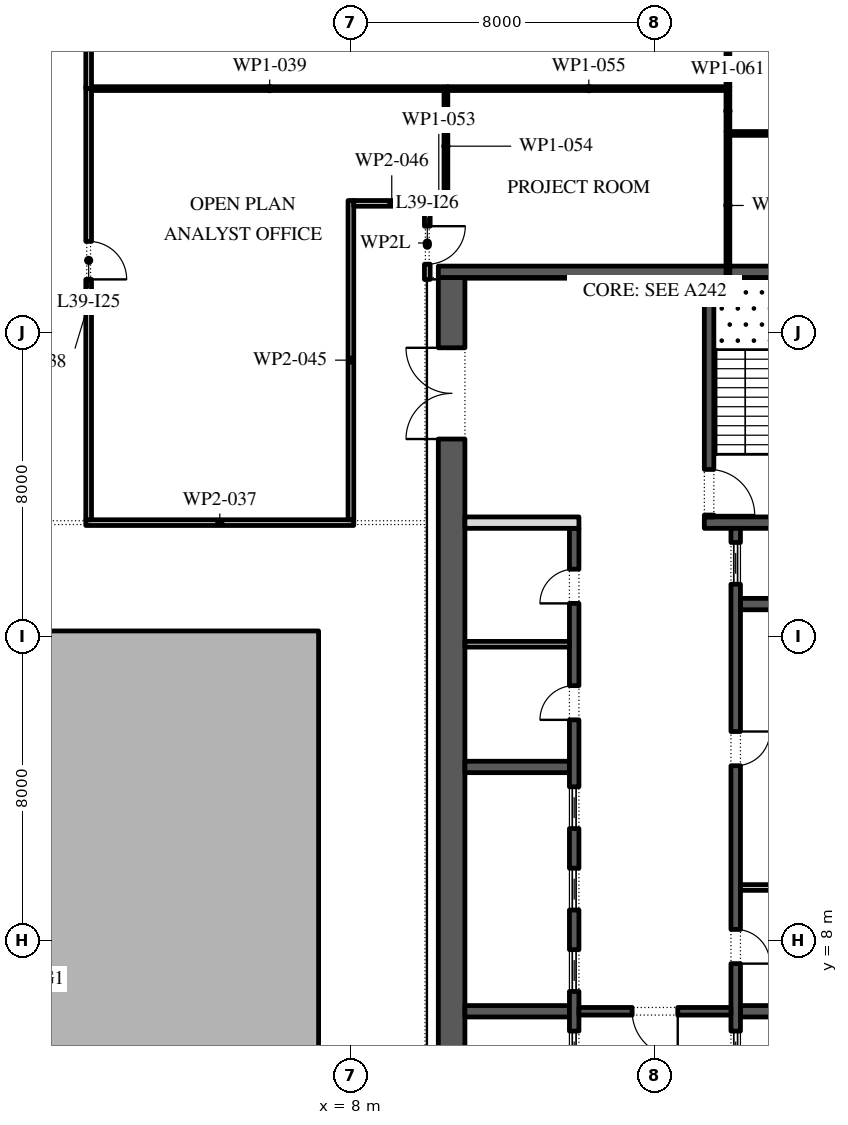
"""IFC4 building model, lengths in metres.
Left out: names, types, materials, properties, quantities, classifications, styles, units other than length and angle.
Written with IfcOpenShell. Run it as: python <this file> out.ifc"""

import sys

from ifc_helpers import new_model, si_unit, direction, frame, frame_2d, origin, place, context, subcontext, project, spatial, polyline, rectangle, outline, extrude, element, fill, save


model = new_model("IFC4")
c1 = context("Model", 3, precision=1e-05, world=origin(), true_north=direction((0.0, 1.0)))
c2 = subcontext(c1, "Body", "Model", "MODEL_VIEW")
j1 = project(units=[si_unit("LENGTHUNIT", "METRE"), si_unit("PLANEANGLEUNIT", "RADIAN")], contexts=[c1])
p1 = place(None, origin())
s1 = spatial("IfcSite", under=j1, at=p1, CompositionType="ELEMENT")
p2 = place(p1, origin())
s2 = spatial("IfcBuilding", under=s1, at=p2, CompositionType="ELEMENT")
p3 = place(p2, frame((0.0, 0.0, 180.0)))
s3 = spatial("IfcBuildingStorey", under=s2, at=p3, CompositionType="ELEMENT", Elevation=180.0)
p4 = place(p3, origin())
e1 = element("IfcWall", 1, at=p4, inside=s3, PredefinedType="STANDARD", context=c2, shape_type="SweptSolid", body=[
    extrude(outline(polyline([(-7.15, -2.15), (7.15, -2.15), (7.15, 16.15), (-7.15, 16.15), (-7.15, -2.15)]), holes=[polyline([(-7.0, -2.0), (-7.0, 16.0), (7.0, 16.0), (7.0, -2.0), (-7.0, -2.0)])]), origin(), (0.0, 0.0, 1.0), 4.0),
])
p5 = place(p3, frame((10.65, -2.45, 0.0), z_axis=(0.0, 0.0, 1.0), x_axis=(0.0, 1.0, 0.0)))
e2 = element("IfcWall", 2, at=p5, inside=s3, PredefinedType="SHEAR", context=c2, shape_type="SweptSolid", body=[
    extrude(rectangle(XDim=27.9, YDim=0.7, at=frame_2d((13.95, 0.0))), origin(), (0.0, 0.0, 1.0), 4.0),
])
p6 = place(p5, frame((23.65, 0.0, 0.0)))
e3 = element("IfcOpeningElement", 3, at=p6, cuts=e2, PredefinedType="OPENING", context=c2, shape_type="SweptSolid", body=[
    extrude(rectangle(XDim=2.4, YDim=2.1, at=frame_2d((1.2, 1.05))), frame((0.0, 0.36, 0.0), z_axis=(0.0, -1.0, 0.0), x_axis=(1.0, 0.0, 0.0)), (0.0, 0.0, 1.0), 0.72),
])
p7 = place(p5, frame((1.087, 0.0, 0.0)))
e4 = element("IfcOpeningElement", 4, at=p7, cuts=e2, PredefinedType="OPENING", context=c2, shape_type="SweptSolid", body=[
    extrude(rectangle(XDim=0.9, YDim=2.1, at=frame_2d((0.45, 1.05))), frame((0.0, 0.36, 0.0), z_axis=(0.0, -1.0, 0.0), x_axis=(1.0, 0.0, 0.0)), (0.0, 0.0, 1.0), 0.72),
])
p8 = place(p5, frame((4.262, 0.0, 0.0)))
e5 = element("IfcOpeningElement", 5, at=p8, cuts=e2, PredefinedType="OPENING", context=c2, shape_type="SweptSolid", body=[
    extrude(rectangle(XDim=1.0, YDim=2.1, at=frame_2d((0.5, 1.05))), frame((0.0, 0.36, 0.0), z_axis=(0.0, -1.0, 0.0), x_axis=(1.0, 0.0, 0.0)), (0.0, 0.0, 1.0), 0.72),
])
p9 = place(p3, frame((10.3, 25.6, 0.0), z_axis=(0.0, 0.0, 1.0), x_axis=(1.0, 0.0, 0.0)))
e6 = element("IfcWall", 6, at=p9, inside=s3, PredefinedType="SHEAR", context=c2, shape_type="SweptSolid", body=[
    extrude(rectangle(XDim=11.4, YDim=0.3, at=frame_2d((5.7, 0.0))), origin(), (0.0, 0.0, 1.0), 4.0),
])
p10 = place(p3, frame((17.3, 19.0, 0.0), z_axis=(0.0, 0.0, 1.0), x_axis=(1.0, 0.0, 0.0)))
e7 = element("IfcWall", 7, at=p10, inside=s3, PredefinedType="SHEAR", context=c2, shape_type="SweptSolid", body=[
    extrude(rectangle(XDim=3.7, YDim=0.3, at=frame_2d((1.85, 0.0))), origin(), (0.0, 0.0, 1.0), 4.0),
])
p11 = place(p3, frame((17.425, 19.15, 0.0), z_axis=(0.0, 0.0, 1.0), x_axis=(0.0, 1.0, 0.0)))
e8 = element("IfcWall", 8, at=p11, inside=s3, PredefinedType="SHEAR", context=c2, shape_type="SweptSolid", body=[
    extrude(rectangle(XDim=6.3, YDim=0.25, at=frame_2d((3.15, 0.0))), origin(), (0.0, 0.0, 1.0), 4.0),
])
p12 = place(p11, frame((0.05, 0.0, 0.0)))
e9 = element("IfcOpeningElement", 9, at=p12, cuts=e8, PredefinedType="OPENING", context=c2, shape_type="SweptSolid", body=[
    extrude(rectangle(XDim=1.2, YDim=2.1, at=frame_2d((0.6, 1.05))), frame((0.0, 0.135, 0.0), z_axis=(0.0, -1.0, 0.0), x_axis=(1.0, 0.0, 0.0)), (0.0, 0.0, 1.0), 0.27),
])
for number, where, z_axis, x_axis in (
    (10, (18.25, 6.143, 0.0), (0.0, 0.0, 1.0), (1.0, 0.0, 0.0)),
    (11, (18.25, 16.857, 0.0), (0.0, 0.0, 1.0), (1.0, 0.0, 0.0)),
):
    element("IfcWall", number, at=place(p3, frame(where, z_axis=z_axis, x_axis=x_axis)), inside=s3, PredefinedType="SHEAR", context=c2, shape_type="SweptSolid", body=[
        extrude(rectangle(XDim=2.75, YDim=0.3, at=frame_2d((1.375, 0.0))), origin(), (0.0, 0.0, 1.0), 4.0),
    ])
p13 = place(p3, frame((18.125, 4.15, 0.0), z_axis=(0.0, 0.0, 1.0), x_axis=(0.0, 1.0, 0.0)))
e12 = element("IfcWall", 12, at=p13, inside=s3, PredefinedType="SHEAR", context=c2, shape_type="SweptSolid", body=[
    extrude(rectangle(XDim=14.7, YDim=0.25, at=frame_2d((7.35, 0.0))), origin(), (0.0, 0.0, 1.0), 4.0),
])
p14 = place(p13, frame((3.246, 0.0, 0.0)))
e13 = element("IfcOpeningElement", 13, at=p14, cuts=e12, PredefinedType="OPENING", context=c2, shape_type="SweptSolid", body=[
    extrude(rectangle(XDim=0.9, YDim=2.1, at=frame_2d((0.45, 1.05))), frame((0.0, 0.135, 0.0), z_axis=(0.0, -1.0, 0.0), x_axis=(1.0, 0.0, 0.0)), (0.0, 0.0, 1.0), 0.27),
])
p15 = place(p13, frame((8.454, 0.0, 0.0)))
e14 = element("IfcOpeningElement", 14, at=p15, cuts=e12, PredefinedType="OPENING", context=c2, shape_type="SweptSolid", body=[
    extrude(rectangle(XDim=0.9, YDim=2.1, at=frame_2d((0.45, 1.05))), frame((0.0, 0.135, 0.0), z_axis=(0.0, -1.0, 0.0), x_axis=(1.0, 0.0, 0.0)), (0.0, 0.0, 1.0), 0.27),
])
p16 = place(p13, frame((0.371, 0.0, 0.0)))
e15 = element("IfcOpeningElement", 15, at=p16, cuts=e12, PredefinedType="OPENING", context=c2, shape_type="SweptSolid", body=[
    extrude(rectangle(XDim=1.1, YDim=2.1, at=frame_2d((0.55, 1.05))), frame((0.0, 0.135, 0.0), z_axis=(0.0, -1.0, 0.0), x_axis=(1.0, 0.0, 0.0)), (0.0, 0.0, 1.0), 0.27),
])
p17 = place(p13, frame((13.229, 0.0, 0.0)))
e16 = element("IfcOpeningElement", 16, at=p17, cuts=e12, PredefinedType="OPENING", context=c2, shape_type="SweptSolid", body=[
    extrude(rectangle(XDim=1.1, YDim=2.1, at=frame_2d((0.55, 1.05))), frame((0.0, 0.135, 0.0), z_axis=(0.0, -1.0, 0.0), x_axis=(1.0, 0.0, 0.0)), (0.0, 0.0, 1.0), 0.27),
])
p18 = place(p3, frame((18.25, 9.4, 0.0), z_axis=(0.0, 0.0, 1.0), x_axis=(1.0, 0.0, 0.0)))
e17 = element("IfcWall", 17, at=p18, inside=s3, PredefinedType="PARTITIONING", context=c2, shape_type="SweptSolid", body=[
    extrude(rectangle(XDim=2.75, YDim=0.15, at=frame_2d((1.375, 0.0))), origin(), (0.0, 0.0, 1.0), 4.0),
])
for number, where, z_axis, x_axis in (
    (18, (11.0, 6.143, 0.0), (0.0, 0.0, 1.0), (1.0, 0.0, 0.0)),
    (19, (11.0, 12.571, 0.0), (0.0, 0.0, 1.0), (1.0, 0.0, 0.0)),
):
    element("IfcWall", number, at=place(p3, frame(where, z_axis=z_axis, x_axis=x_axis)), inside=s3, PredefinedType="SHEAR", context=c2, shape_type="SweptSolid", body=[
        extrude(rectangle(XDim=2.75, YDim=0.3, at=frame_2d((1.375, 0.0))), origin(), (0.0, 0.0, 1.0), 4.0),
    ])
p19 = place(p3, frame((13.875, -2.45, 0.0), z_axis=(0.0, 0.0, 1.0), x_axis=(0.0, 1.0, 0.0)))
e20 = element("IfcWall", 20, at=p19, inside=s3, PredefinedType="SHEAR", context=c2, shape_type="SweptSolid", body=[
    extrude(rectangle(XDim=21.3, YDim=0.25, at=frame_2d((10.65, 0.0))), origin(), (0.0, 0.0, 1.0), 4.0),
])
p20 = place(p19, frame((16.261, 0.0, 0.0)))
e21 = element("IfcOpeningElement", 21, at=p20, cuts=e20, PredefinedType="OPENING", context=c2, shape_type="SweptSolid", body=[
    extrude(rectangle(XDim=0.9, YDim=2.1, at=frame_2d((0.45, 1.05))), frame((0.0, 0.135, 0.0), z_axis=(0.0, -1.0, 0.0), x_axis=(1.0, 0.0, 0.0)), (0.0, 0.0, 1.0), 0.27),
])
p21 = place(p19, frame((19.325, 0.0, 0.0)))
e22 = element("IfcOpeningElement", 22, at=p21, cuts=e20, PredefinedType="OPENING", context=c2, shape_type="SweptSolid", body=[
    extrude(rectangle(XDim=0.9, YDim=2.1, at=frame_2d((0.45, 1.05))), frame((0.0, 0.135, 0.0), z_axis=(0.0, -1.0, 0.0), x_axis=(1.0, 0.0, 0.0)), (0.0, 0.0, 1.0), 0.27),
])
p22 = place(p19, frame((6.971, 0.0, 0.0)))
e23 = element("IfcOpeningElement", 23, at=p22, cuts=e20, PredefinedType="OPENING", context=c2, shape_type="SweptSolid", body=[
    extrude(rectangle(XDim=1.1, YDim=2.1, at=frame_2d((0.55, 1.05))), frame((0.0, 0.135, 0.0), z_axis=(0.0, -1.0, 0.0), x_axis=(1.0, 0.0, 0.0)), (0.0, 0.0, 1.0), 0.27),
])
p23 = place(p19, frame((9.114, 0.0, 0.0)))
e24 = element("IfcOpeningElement", 24, at=p23, cuts=e20, PredefinedType="OPENING", context=c2, shape_type="SweptSolid", body=[
    extrude(rectangle(XDim=1.1, YDim=2.1, at=frame_2d((0.55, 1.05))), frame((0.0, 0.135, 0.0), z_axis=(0.0, -1.0, 0.0), x_axis=(1.0, 0.0, 0.0)), (0.0, 0.0, 1.0), 0.27),
])
p24 = place(p19, frame((11.257, 0.0, 0.0)))
e25 = element("IfcOpeningElement", 25, at=p24, cuts=e20, PredefinedType="OPENING", context=c2, shape_type="SweptSolid", body=[
    extrude(rectangle(XDim=1.1, YDim=2.1, at=frame_2d((0.55, 1.05))), frame((0.0, 0.135, 0.0), z_axis=(0.0, -1.0, 0.0), x_axis=(1.0, 0.0, 0.0)), (0.0, 0.0, 1.0), 0.27),
])
p25 = place(p19, frame((13.4, 0.0, 0.0)))
e26 = element("IfcOpeningElement", 26, at=p25, cuts=e20, PredefinedType="OPENING", context=c2, shape_type="SweptSolid", body=[
    extrude(rectangle(XDim=1.1, YDim=2.1, at=frame_2d((0.55, 1.05))), frame((0.0, 0.135, 0.0), z_axis=(0.0, -1.0, 0.0), x_axis=(1.0, 0.0, 0.0)), (0.0, 0.0, 1.0), 0.27),
])
p26 = place(p3, frame((11.0, 19.0, 0.0), z_axis=(0.0, 0.0, 1.0), x_axis=(1.0, 0.0, 0.0)))
e27 = element("IfcWall", 27, at=p26, inside=s3, PredefinedType="PARTITIONING", context=c2, shape_type="SweptSolid", body=[
    extrude(rectangle(XDim=3.0, YDim=0.3, at=frame_2d((1.5, 0.0))), origin(), (0.0, 0.0, 1.0), 4.0),
])
p27 = place(p3, frame((11.0, 15.8, 0.0), z_axis=(0.0, 0.0, 1.0), x_axis=(1.0, 0.0, 0.0)))
e28 = element("IfcWall", 28, at=p27, inside=s3, PredefinedType="PARTITIONING", context=c2, shape_type="SweptSolid", body=[
    extrude(rectangle(XDim=2.75, YDim=0.15, at=frame_2d((1.375, 0.0))), origin(), (0.0, 0.0, 1.0), 4.0),
])
p28 = place(p3, frame((14.0, 6.143, 0.0), z_axis=(0.0, 0.0, 1.0), x_axis=(1.0, 0.0, 0.0)))
e29 = element("IfcWall", 29, at=p28, inside=s3, PredefinedType="SHEAR", context=c2, shape_type="SweptSolid", body=[
    extrude(rectangle(XDim=4.0, YDim=0.2, at=frame_2d((2.0, 0.0))), origin(), (0.0, 0.0, 1.0), 4.0),
])
p29 = place(p28, frame((1.4, 0.0, 0.0)))
e30 = element("IfcOpeningElement", 30, at=p29, cuts=e29, PredefinedType="OPENING", context=c2, shape_type="SweptSolid", body=[
    extrude(rectangle(XDim=1.2, YDim=2.1, at=frame_2d((0.6, 1.05))), frame((0.0, 0.11, 0.0), z_axis=(0.0, -1.0, 0.0), x_axis=(1.0, 0.0, 0.0)), (0.0, 0.0, 1.0), 0.22),
])
p30 = place(p3, frame((1.025, 19.0, 0.0), z_axis=(0.0, 0.0, 1.0), x_axis=(1.0, 0.0, 0.0)))
e31 = element("IfcWall", 31, at=p30, inside=s3, PredefinedType="PARTITIONING", context=c2, shape_type="SweptSolid", body=[
    extrude(rectangle(XDim=7.05, YDim=0.15, at=frame_2d((3.525, 0.0))), origin(), (0.0, 0.0, 1.0), 4.0),
])
p31 = place(p3, frame((1.1, 30.47, 0.0), z_axis=(0.0, 0.0, 1.0), x_axis=(0.0, -1.0, 0.0)))
e32 = element("IfcWall", 32, at=p31, inside=s3, PredefinedType="PARTITIONING", context=c2, shape_type="SweptSolid", body=[
    extrude(rectangle(XDim=11.395, YDim=0.15, at=frame_2d((5.698, 0.0))), origin(), (0.0, 0.0, 1.0), 4.0),
])
p32 = place(p31, frame((4.07, 0.0, 0.0)))
e33 = element("IfcOpeningElement", 33, at=p32, cuts=e32, PredefinedType="OPENING", context=c2, shape_type="SweptSolid", body=[
    extrude(rectangle(XDim=1.0, YDim=2.1, at=frame_2d((0.5, 1.05))), frame((0.0, 0.085, 0.0), z_axis=(0.0, -1.0, 0.0), x_axis=(1.0, 0.0, 0.0)), (0.0, 0.0, 1.0), 0.17),
])
p33 = place(p3, frame((1.175, 30.42, 0.0), z_axis=(0.0, 0.0, 1.0), x_axis=(1.0, 0.0, 0.0)))
e34 = element("IfcWall", 34, at=p33, inside=s3, PredefinedType="PARTITIONING", context=c2, shape_type="SweptSolid", body=[
    extrude(rectangle(XDim=9.375, YDim=0.1, at=frame_2d((4.688, 0.0))), origin(), (0.0, 0.0, 1.0), 4.0),
])
p34 = place(p3, frame((1.1, 36.05, 0.0), z_axis=(0.0, 0.0, 1.0), x_axis=(0.0, -1.0, 0.0)))
e35 = element("IfcWall", 35, at=p34, inside=s3, PredefinedType="PARTITIONING", context=c2, shape_type="SweptSolid", body=[
    extrude(rectangle(XDim=5.63, YDim=0.15, at=frame_2d((2.815, 0.0))), origin(), (0.0, 0.0, 1.0), 4.0),
])
p35 = place(p34, frame((2.98, 0.0, 0.0)))
e36 = element("IfcOpeningElement", 36, at=p35, cuts=e35, PredefinedType="OPENING", context=c2, shape_type="SweptSolid", body=[
    extrude(rectangle(XDim=1.0, YDim=2.1, at=frame_2d((0.5, 1.05))), frame((0.0, 0.085, 0.0), z_axis=(0.0, -1.0, 0.0), x_axis=(1.0, 0.0, 0.0)), (0.0, 0.0, 1.0), 0.17),
])
p36 = place(p3, frame((8.0, 19.075, 0.0), z_axis=(0.0, 0.0, 1.0), x_axis=(0.0, 1.0, 0.0)))
e37 = element("IfcWall", 37, at=p36, inside=s3, PredefinedType="PARTITIONING", context=c2, shape_type="SweptSolid", body=[
    extrude(rectangle(XDim=8.4, YDim=0.15, at=frame_2d((4.2, 0.0))), origin(), (0.0, 0.0, 1.0), 4.0),
])
p37 = place(p3, frame((8.075, 27.4, 0.0), z_axis=(0.0, 0.0, 1.0), x_axis=(1.0, 0.0, 0.0)))
e38 = element("IfcWall", 38, at=p37, inside=s3, PredefinedType="PARTITIONING", context=c2, shape_type="SweptSolid", body=[
    extrude(rectangle(XDim=2.0, YDim=0.15, at=frame_2d((1.0, 0.0))), origin(), (0.0, 0.0, 1.0), 4.0),
])
p38 = place(p3, frame((10.01, 27.315, 0.0), z_axis=(0.0, 0.0, 1.0), x_axis=(0.0, -1.0, 0.0)))
e39 = element("IfcWall", 39, at=p38, inside=s3, PredefinedType="PARTITIONING", context=c2, shape_type="SweptSolid", body=[
    extrude(rectangle(XDim=1.915, YDim=0.15, at=frame_2d((0.958, 0.0))), origin(), (0.0, 0.0, 1.0), 3.02),
])
p39 = place(p38, frame((0.515, 0.0, 0.0)))
e40 = element("IfcOpeningElement", 40, at=p39, cuts=e39, PredefinedType="OPENING", context=c2, shape_type="SweptSolid", body=[
    extrude(rectangle(XDim=1.0, YDim=2.1, at=frame_2d((0.5, 1.05))), frame((0.0, 0.085, 0.0), z_axis=(0.0, -1.0, 0.0), x_axis=(1.0, 0.0, 0.0)), (0.0, 0.0, 1.0), 0.17),
])
p40 = place(p3, frame((10.55, 27.39, 0.0), z_axis=(0.0, 0.0, 1.0), x_axis=(-1.0, 0.0, 0.0)))
e41 = element("IfcWall", 41, at=p40, inside=s3, PredefinedType="PARTITIONING", context=c2, shape_type="SweptSolid", body=[
    extrude(rectangle(XDim=0.475, YDim=0.1, at=frame_2d((0.238, 0.0))), origin(), (0.0, 0.0, 1.0), 4.0),
])
p41 = place(p3, frame((10.5, 30.37, 0.0), z_axis=(0.0, 0.0, 1.0), x_axis=(0.0, -1.0, 0.0)))
e42 = element("IfcWall", 42, at=p41, inside=s3, PredefinedType="PARTITIONING", context=c2, shape_type="SweptSolid", body=[
    extrude(rectangle(XDim=2.93, YDim=0.1, at=frame_2d((1.465, 0.0))), origin(), (0.0, 0.0, 1.0), 4.0),
])
p42 = place(p3, frame((10.55, 30.42, 0.0), z_axis=(0.0, 0.0, 1.0), x_axis=(1.0, 0.0, 0.0)))
e43 = element("IfcWall", 43, at=p42, inside=s3, PredefinedType="PARTITIONING", context=c2, shape_type="SweptSolid", body=[
    extrude(rectangle(XDim=7.42, YDim=0.1, at=frame_2d((3.71, 0.0))), origin(), (0.0, 0.0, 1.0), 4.0),
])
p43 = place(p3, frame((17.92, 25.4, 0.0), z_axis=(0.0, 0.0, 1.0), x_axis=(0.0, 1.0, 0.0)))
e44 = element("IfcWall", 44, at=p43, inside=s3, PredefinedType="PARTITIONING", context=c2, shape_type="SweptSolid", body=[
    extrude(rectangle(XDim=3.89, YDim=0.1, at=frame_2d((1.945, 0.0))), origin(), (0.0, 0.0, 1.0), 4.0),
])
p44 = place(p3, frame((17.92, 29.29, 0.0), z_axis=(0.0, 0.0, 1.0), x_axis=(0.0, 1.0, 0.0)))
e45 = element("IfcWall", 45, at=p44, inside=s3, PredefinedType="PARTITIONING", context=c2, shape_type="SweptSolid", body=[
    extrude(rectangle(XDim=1.08, YDim=0.1, at=frame_2d((0.54, 0.0))), origin(), (0.0, 0.0, 1.0), 4.0),
])
p45 = place(p3, frame((17.97, 29.24, 0.0), z_axis=(0.0, 0.0, 1.0), x_axis=(1.0, 0.0, 0.0)))
e46 = element("IfcWall", 46, at=p45, inside=s3, PredefinedType="PARTITIONING", context=c2, shape_type="SweptSolid", body=[
    extrude(rectangle(XDim=4.04, YDim=0.1, at=frame_2d((2.02, 0.0))), origin(), (0.0, 0.0, 1.0), 4.0),
])
p46 = place(p3, frame((17.92, 30.47, 0.0), z_axis=(0.0, 0.0, 1.0), x_axis=(0.0, 1.0, 0.0)))
e47 = element("IfcWall", 47, at=p46, inside=s3, PredefinedType="PARTITIONING", context=c2, shape_type="SweptSolid", body=[
    extrude(rectangle(XDim=5.48, YDim=0.1, at=frame_2d((2.74, 0.0))), origin(), (0.0, 0.0, 1.0), 4.0),
])
p47 = place(p14, frame((0.9, -0.2, 0.0), z_axis=(0.0, 0.0, 1.0), x_axis=(-1.0, 0.0, 0.0)))
e48 = element("IfcDoor", 48, at=p47, inside=s3, OperationType="SINGLE_SWING_LEFT", PredefinedType="DOOR", context=c2, shape_type="SweptSolid", body=[
    extrude(rectangle(XDim=0.9, YDim=2.1, at=frame_2d((0.45, 1.05))), frame((0.0, -0.075, 0.0), z_axis=(0.0, -1.0, 0.0), x_axis=(1.0, 0.0, 0.0)), (0.0, 0.0, 1.0), 0.05),
])
fill(e13, e48)
p48 = place(p15, frame((0.9, -0.2, 0.0), z_axis=(0.0, 0.0, 1.0), x_axis=(-1.0, 0.0, 0.0)))
e49 = element("IfcDoor", 49, at=p48, inside=s3, OperationType="SINGLE_SWING_RIGHT", PredefinedType="DOOR", context=c2, shape_type="SweptSolid", body=[
    extrude(rectangle(XDim=0.9, YDim=2.1, at=frame_2d((0.45, 1.05))), frame((0.0, -0.075, 0.0), z_axis=(0.0, -1.0, 0.0), x_axis=(1.0, 0.0, 0.0)), (0.0, 0.0, 1.0), 0.05),
])
fill(e14, e49)
p49 = place(p16, origin())
e50 = element("IfcDoor", 50, at=p49, inside=s3, OperationType="SLIDING_TO_LEFT", PredefinedType="DOOR", context=c2, shape_type="SweptSolid", body=[
    extrude(rectangle(XDim=1.1, YDim=2.1, at=frame_2d((0.55, 1.05))), frame((0.0, 0.025, 0.0), z_axis=(0.0, -1.0, 0.0), x_axis=(1.0, 0.0, 0.0)), (0.0, 0.0, 1.0), 0.05),
])
fill(e15, e50)
p50 = place(p17, origin())
e51 = element("IfcDoor", 51, at=p50, inside=s3, OperationType="SLIDING_TO_LEFT", PredefinedType="DOOR", context=c2, shape_type="SweptSolid", body=[
    extrude(rectangle(XDim=1.1, YDim=2.1, at=frame_2d((0.55, 1.05))), frame((0.0, 0.025, 0.0), z_axis=(0.0, -1.0, 0.0), x_axis=(1.0, 0.0, 0.0)), (0.0, 0.0, 1.0), 0.05),
])
fill(e16, e51)
p51 = place(p20, origin())
e52 = element("IfcDoor", 52, at=p51, inside=s3, OperationType="SINGLE_SWING_RIGHT", PredefinedType="DOOR", context=c2, shape_type="SweptSolid", body=[
    extrude(rectangle(XDim=0.9, YDim=2.1, at=frame_2d((0.45, 1.05))), frame((0.0, 0.125, 0.0), z_axis=(0.0, -1.0, 0.0), x_axis=(1.0, 0.0, 0.0)), (0.0, 0.0, 1.0), 0.05),
])
fill(e21, e52)
p52 = place(p21, origin())
e53 = element("IfcDoor", 53, at=p52, inside=s3, OperationType="SINGLE_SWING_RIGHT", PredefinedType="DOOR", context=c2, shape_type="SweptSolid", body=[
    extrude(rectangle(XDim=0.9, YDim=2.1, at=frame_2d((0.45, 1.05))), frame((0.0, 0.125, 0.0), z_axis=(0.0, -1.0, 0.0), x_axis=(1.0, 0.0, 0.0)), (0.0, 0.0, 1.0), 0.05),
])
fill(e22, e53)
p53 = place(p22, origin())
e54 = element("IfcDoor", 54, at=p53, inside=s3, OperationType="SLIDING_TO_LEFT", PredefinedType="DOOR", context=c2, shape_type="SweptSolid", body=[
    extrude(rectangle(XDim=1.1, YDim=2.1, at=frame_2d((0.55, 1.05))), frame((0.0, 0.025, 0.0), z_axis=(0.0, -1.0, 0.0), x_axis=(1.0, 0.0, 0.0)), (0.0, 0.0, 1.0), 0.05),
])
fill(e23, e54)
p54 = place(p23, origin())
e55 = element("IfcDoor", 55, at=p54, inside=s3, OperationType="SLIDING_TO_LEFT", PredefinedType="DOOR", context=c2, shape_type="SweptSolid", body=[
    extrude(rectangle(XDim=1.1, YDim=2.1, at=frame_2d((0.55, 1.05))), frame((0.0, 0.025, 0.0), z_axis=(0.0, -1.0, 0.0), x_axis=(1.0, 0.0, 0.0)), (0.0, 0.0, 1.0), 0.05),
])
fill(e24, e55)
p55 = place(p24, origin())
e56 = element("IfcDoor", 56, at=p55, inside=s3, OperationType="SLIDING_TO_LEFT", PredefinedType="DOOR", context=c2, shape_type="SweptSolid", body=[
    extrude(rectangle(XDim=1.1, YDim=2.1, at=frame_2d((0.55, 1.05))), frame((0.0, 0.025, 0.0), z_axis=(0.0, -1.0, 0.0), x_axis=(1.0, 0.0, 0.0)), (0.0, 0.0, 1.0), 0.05),
])
fill(e25, e56)
p56 = place(p25, origin())
e57 = element("IfcDoor", 57, at=p56, inside=s3, OperationType="SLIDING_TO_LEFT", PredefinedType="DOOR", context=c2, shape_type="SweptSolid", body=[
    extrude(rectangle(XDim=1.1, YDim=2.1, at=frame_2d((0.55, 1.05))), frame((0.0, 0.025, 0.0), z_axis=(0.0, -1.0, 0.0), x_axis=(1.0, 0.0, 0.0)), (0.0, 0.0, 1.0), 0.05),
])
fill(e26, e57)
p57 = place(p29, frame((1.2, 0.0, 0.0), z_axis=(0.0, 0.0, 1.0), x_axis=(-1.0, 0.0, 0.0)))
e58 = element("IfcDoor", 58, at=p57, inside=s3, OperationType="SINGLE_SWING_RIGHT", PredefinedType="DOOR", context=c2, shape_type="SweptSolid", body=[
    extrude(rectangle(XDim=1.2, YDim=2.1, at=frame_2d((0.6, 1.05))), frame((0.0, 0.025, 0.0), z_axis=(0.0, -1.0, 0.0), x_axis=(1.0, 0.0, 0.0)), (0.0, 0.0, 1.0), 0.05),
])
fill(e30, e58)
p58 = place(p6, origin())
e59 = element("IfcDoor", 59, at=p58, inside=s3, OperationType="DOUBLE_DOOR_SINGLE_SWING", PredefinedType="DOOR", context=c2, shape_type="SweptSolid", body=[
    extrude(rectangle(XDim=2.4, YDim=2.1, at=frame_2d((1.2, 1.05))), frame((0.0, 0.025, 0.0), z_axis=(0.0, -1.0, 0.0), x_axis=(1.0, 0.0, 0.0)), (0.0, 0.0, 1.0), 0.05),
])
fill(e3, e59)
p59 = place(p12, frame((1.2, 0.0, 0.0), z_axis=(0.0, 0.0, 1.0), x_axis=(-1.0, 0.0, 0.0)))
e60 = element("IfcDoor", 60, at=p59, inside=s3, OperationType="SINGLE_SWING_LEFT", PredefinedType="DOOR", context=c2, shape_type="SweptSolid", body=[
    extrude(rectangle(XDim=1.2, YDim=2.1, at=frame_2d((0.6, 1.05))), frame((0.0, 0.025, 0.0), z_axis=(0.0, -1.0, 0.0), x_axis=(1.0, 0.0, 0.0)), (0.0, 0.0, 1.0), 0.05),
])
fill(e9, e60)
p60 = place(p32, origin())
e61 = element("IfcDoor", 61, at=p60, inside=s3, OperationType="SINGLE_SWING_LEFT", PredefinedType="DOOR", context=c2, shape_type="SweptSolid", body=[
    extrude(rectangle(XDim=1.0, YDim=2.1, at=frame_2d((0.5, 1.05))), frame((0.0, 0.025, 0.0), z_axis=(0.0, -1.0, 0.0), x_axis=(1.0, 0.0, 0.0)), (0.0, 0.0, 1.0), 0.05),
])
fill(e33, e61)
p61 = place(p39, origin())
e62 = element("IfcDoor", 62, at=p61, inside=s3, OperationType="SINGLE_SWING_RIGHT", PredefinedType="DOOR", context=c2, shape_type="SweptSolid", body=[
    extrude(rectangle(XDim=1.0, YDim=2.1, at=frame_2d((0.5, 1.05))), frame((0.0, 0.025, 0.0), z_axis=(0.0, -1.0, 0.0), x_axis=(1.0, 0.0, 0.0)), (0.0, 0.0, 1.0), 0.05),
])
fill(e40, e62)
save(model, sys.argv[1])
